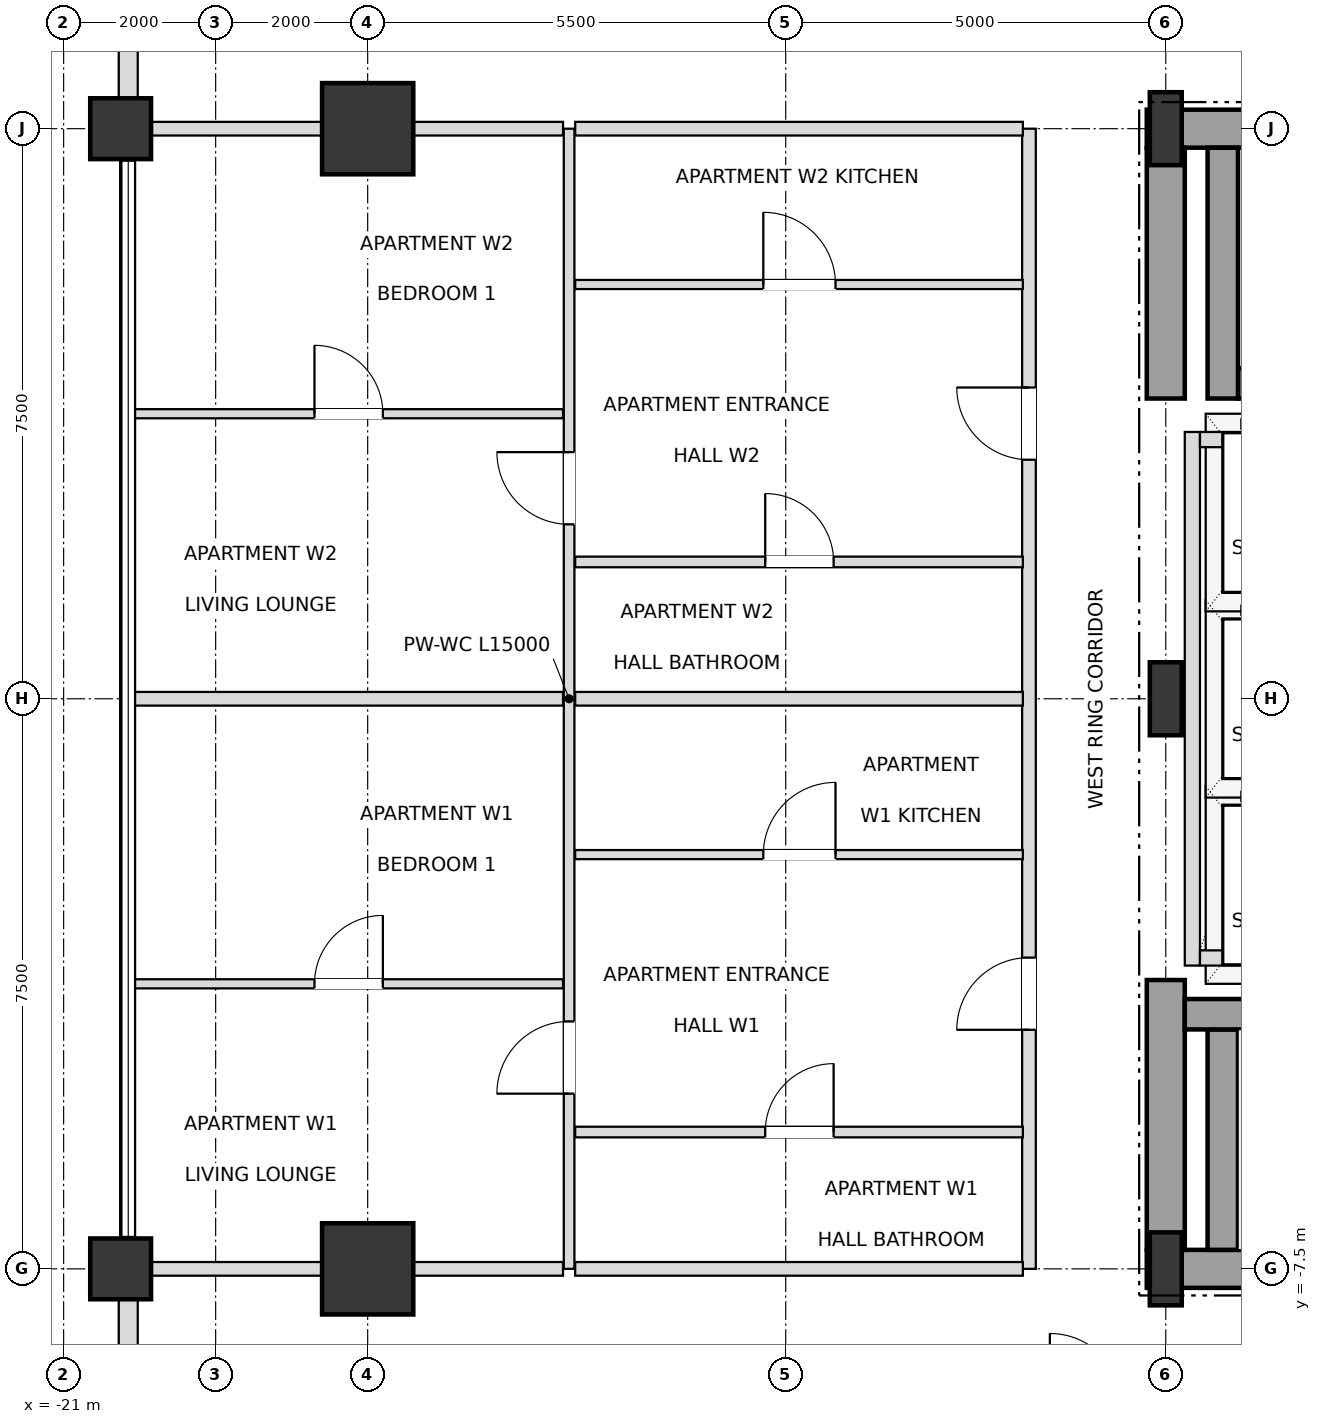
"""IFC4 building model, lengths in metres.
Left out: names, types, materials, properties, quantities, classifications, styles, units other than length and angle.
Written with IfcOpenShell. Run it as: python <this file> out.ifc"""

import sys

from ifc_helpers import new_model, si_unit, direction, frame, frame_2d, origin, origin_2d, place, context, subcontext, project, spatial, rectangle, i_section, extrude, element, fill, save


model = new_model("IFC4")
c1 = context("Model", 3, precision=1e-05, world=origin(), true_north=direction((0.0, 1.0)))
c2 = subcontext(c1, "Body", "Model", "MODEL_VIEW")
j1 = project(units=[si_unit("LENGTHUNIT", "METRE"), si_unit("PLANEANGLEUNIT", "RADIAN")], contexts=[c1])
p1 = place(None, origin())
s1 = spatial("IfcSite", under=j1, at=p1, CompositionType="ELEMENT")
p2 = place(p1, origin())
s2 = spatial("IfcBuilding", under=s1, at=p2, CompositionType="ELEMENT")
p3 = place(p2, frame((0.0, 0.0, 117.0)))
s3 = spatial("IfcBuildingStorey", under=s2, at=p3, CompositionType="ELEMENT", Elevation=117.0)
for number, where, z_axis, x_axis in (
    (1, (-6.5, -7.5, 0.0), (0.0, 0.0, 1.0), (1.0, 0.0, 0.0)),
    (2, (-6.5, 0.0, 0.0), (0.0, 0.0, 1.0), (1.0, 0.0, 0.0)),
    (3, (-6.5, 7.5, 0.0), (0.0, 0.0, 1.0), (1.0, 0.0, 0.0)),
):
    element("IfcColumn", number, at=place(p3, frame(where, z_axis=z_axis, x_axis=x_axis)), inside=s3, PredefinedType="COLUMN", context=c2, shape_type="SweptSolid", body=[
        extrude(i_section(OverallWidth=0.42, OverallDepth=0.96, WebThickness=0.022, FlangeThickness=0.034, at=origin_2d()), origin(), (0.0, 0.0, 1.0), 3.6),
    ])
for number, where, z_axis, x_axis in (
    (4, (-17.0, 7.5, 0.0), (0.0, 0.0, 1.0), (1.0, 0.0, 0.0)),
    (5, (-17.0, -7.5, 0.0), (0.0, 0.0, 1.0), (1.0, 0.0, 0.0)),
):
    element("IfcColumn", number, at=place(p3, frame(where, z_axis=z_axis, x_axis=x_axis)), inside=s3, PredefinedType="USERDEFINED", context=c2, shape_type="SweptSolid", body=[
        extrude(rectangle(XDim=1.2, YDim=1.2, at=origin_2d()), origin(), (0.0, 0.0, 1.0), 3.6),
    ])
for number, where, z_axis, x_axis in (
    (6, (-20.25, -7.5, 0.0), (0.0, 0.0, 1.0), (1.0, 0.0, 0.0)),
    (7, (-20.25, 7.5, 0.0), (0.0, 0.0, 1.0), (1.0, 0.0, 0.0)),
):
    element("IfcColumn", number, at=place(p3, frame(where, z_axis=z_axis, x_axis=x_axis)), inside=s3, PredefinedType="COLUMN", context=c2, shape_type="SweptSolid", body=[
        extrude(rectangle(XDim=0.8, YDim=0.8, at=origin_2d()), origin(), (0.0, 0.0, 1.0), 3.6),
    ])
p4 = place(p3, frame((-20.15, 12.605, 0.0), z_axis=(0.0, 0.0, 1.0), x_axis=(0.0, -1.0, 0.0)))
e8 = element("IfcWall", 8, at=p4, inside=s3, PredefinedType="SOLIDWALL", context=c2, shape_type="SweptSolid", body=[
    extrude(rectangle(XDim=4.71, YDim=0.25, at=frame_2d((2.355, 0.0))), origin(), (0.0, 0.0, 1.0), 2.656),
])
p5 = place(p4, frame((1.455, 0.0, 0.72)))
e9 = element("IfcOpeningElement", 9, at=p5, cuts=e8, PredefinedType="OPENING", context=c2, shape_type="SweptSolid", body=[
    extrude(rectangle(XDim=1.8, YDim=1.68, at=frame_2d((0.9, 0.84))), frame((0.0, 0.135, 0.0), z_axis=(0.0, -1.0, 0.0), x_axis=(1.0, 0.0, 0.0)), (0.0, 0.0, 1.0), 0.27),
])
p6 = place(p3, frame((-20.15, -7.895, 0.0), z_axis=(0.0, 0.0, 1.0), x_axis=(0.0, -1.0, 0.0)))
e10 = element("IfcWall", 10, at=p6, inside=s3, PredefinedType="SOLIDWALL", context=c2, shape_type="SweptSolid", body=[
    extrude(rectangle(XDim=4.71, YDim=0.25, at=frame_2d((2.355, 0.0))), origin(), (0.0, 0.0, 1.0), 2.656),
])
p7 = place(p6, frame((1.455, 0.0, 0.72)))
e11 = element("IfcOpeningElement", 11, at=p7, cuts=e10, PredefinedType="OPENING", context=c2, shape_type="SweptSolid", body=[
    extrude(rectangle(XDim=1.8, YDim=1.68, at=frame_2d((0.9, 0.84))), frame((0.0, 0.135, 0.0), z_axis=(0.0, -1.0, 0.0), x_axis=(1.0, 0.0, 0.0)), (0.0, 0.0, 1.0), 0.27),
])
p8 = place(p3, frame((-6.75, -7.5, 0.0), z_axis=(0.0, 0.0, 1.0), x_axis=(1.0, 0.0, 0.0)))
e12 = element("IfcWall", 12, at=p8, inside=s3, PredefinedType="SHEAR", context=c2, shape_type="SweptSolid", body=[
    extrude(rectangle(XDim=6.75, YDim=0.5, at=frame_2d((3.375, 0.0))), origin(), (0.0, 0.0, 1.0), 3.3),
])
p9 = place(p3, frame((-6.75, 7.5, 0.0), z_axis=(0.0, 0.0, 1.0), x_axis=(1.0, 0.0, 0.0)))
e13 = element("IfcWall", 13, at=p9, inside=s3, PredefinedType="SHEAR", context=c2, shape_type="SweptSolid", body=[
    extrude(rectangle(XDim=6.75, YDim=0.5, at=frame_2d((3.375, 0.0))), origin(), (0.0, 0.0, 1.0), 3.3),
])
p10 = place(p9, frame((1.65, 0.0, 0.0)))
e14 = element("IfcOpeningElement", 14, at=p10, cuts=e13, PredefinedType="OPENING", context=c2, shape_type="SweptSolid", body=[
    extrude(rectangle(XDim=1.05, YDim=2.15, at=frame_2d((0.525, 1.075))), frame((0.0, 0.26, 0.0), z_axis=(0.0, -1.0, 0.0), x_axis=(1.0, 0.0, 0.0)), (0.0, 0.0, 1.0), 0.52),
])
p11 = place(p3, frame((-6.5, -7.25, 0.0), z_axis=(0.0, 0.0, 1.0), x_axis=(0.0, 1.0, 0.0)))
e15 = element("IfcWall", 15, at=p11, inside=s3, PredefinedType="SHEAR", context=c2, shape_type="SweptSolid", body=[
    extrude(rectangle(XDim=3.55, YDim=0.5, at=frame_2d((1.775, 0.0))), origin(), (0.0, 0.0, 1.0), 3.3),
])
p12 = place(p3, frame((-6.5, 3.95, 0.0), z_axis=(0.0, 0.0, 1.0), x_axis=(0.0, 1.0, 0.0)))
e16 = element("IfcWall", 16, at=p12, inside=s3, PredefinedType="SHEAR", context=c2, shape_type="SweptSolid", body=[
    extrude(rectangle(XDim=3.3, YDim=0.5, at=frame_2d((1.65, 0.0))), origin(), (0.0, 0.0, 1.0), 3.3),
])
p13 = place(p3, frame((-5.75, -7.25, 0.0), z_axis=(0.0, 0.0, 1.0), x_axis=(0.0, 1.0, 0.0)))
e17 = element("IfcWall", 17, at=p13, inside=s3, PredefinedType="SHEAR", context=c2, shape_type="SweptSolid", body=[
    extrude(rectangle(XDim=2.9, YDim=0.4, at=frame_2d((1.45, 0.0))), origin(), (0.0, 0.0, 1.0), 3.3),
])
p14 = place(p3, frame((-6.25, -4.15, 0.0), z_axis=(0.0, 0.0, 1.0), x_axis=(1.0, 0.0, 0.0)))
e18 = element("IfcWall", 18, at=p14, inside=s3, PredefinedType="SHEAR", context=c2, shape_type="SweptSolid", body=[
    extrude(rectangle(XDim=7.78, YDim=0.4, at=frame_2d((3.89, 0.0))), origin(), (0.0, 0.0, 1.0), 3.3),
])
p15 = place(p3, frame((-5.55, 4.15, 0.0), z_axis=(0.0, 0.0, 1.0), x_axis=(1.0, 0.0, 0.0)))
e19 = element("IfcWall", 19, at=p15, inside=s3, PredefinedType="SHEAR", context=c2, shape_type="SweptSolid", body=[
    extrude(rectangle(XDim=7.08, YDim=0.4, at=frame_2d((3.54, 0.0))), origin(), (0.0, 0.0, 1.0), 3.3),
])
p16 = place(p3, frame((-5.75, 3.95, 0.0), z_axis=(0.0, 0.0, 1.0), x_axis=(0.0, 1.0, 0.0)))
e20 = element("IfcWall", 20, at=p16, inside=s3, PredefinedType="SHEAR", context=c2, shape_type="SweptSolid", body=[
    extrude(rectangle(XDim=3.3, YDim=0.4, at=frame_2d((1.65, 0.0))), origin(), (0.0, 0.0, 1.0), 3.3),
])
p17 = place(p3, frame((-6.15, -3.51, 0.0), z_axis=(0.0, 0.0, 1.0), x_axis=(0.0, 1.0, 0.0)))
e21 = element("IfcWall", 21, at=p17, inside=s3, PredefinedType="SOLIDWALL", context=c2, shape_type="SweptSolid", body=[
    extrude(rectangle(XDim=7.02, YDim=0.2, at=frame_2d((3.51, 0.0))), origin(), (0.0, 0.0, 1.0), 3.3),
])
for number, where, z_axis, x_axis in (
    (22, (-6.05, -3.41, 0.0), (0.0, 0.0, 1.0), (1.0, 0.0, 0.0)),
    (23, (-6.05, 3.41, 0.0), (0.0, 0.0, 1.0), (1.0, 0.0, 0.0)),
):
    element("IfcWall", number, at=place(p3, frame(where, z_axis=z_axis, x_axis=x_axis)), inside=s3, PredefinedType="SOLIDWALL", context=c2, shape_type="SweptSolid", body=[
        extrude(rectangle(XDim=2.2, YDim=0.2, at=frame_2d((1.1, 0.0))), origin(), (0.0, 0.0, 1.0), 3.3),
    ])
p18 = place(p3, frame((-14.35, -7.5, 0.0), z_axis=(0.0, 0.0, 1.0), x_axis=(0.0, 1.0, 0.0)))
e24 = element("IfcWall", 24, at=p18, inside=s3, PredefinedType="PARTITIONING", context=c2, shape_type="SweptSolid", body=[
    extrude(rectangle(XDim=15.0, YDim=0.14, at=frame_2d((7.5, 0.0))), origin(), (0.0, 0.0, 1.0), 3.3),
])
p19 = place(p18, frame((2.305, 0.0, 0.0)))
e25 = element("IfcOpeningElement", 25, at=p19, cuts=e24, PredefinedType="OPENING", context=c2, shape_type="SweptSolid", body=[
    extrude(rectangle(XDim=0.95, YDim=2.1, at=frame_2d((0.475, 1.05))), frame((0.0, 0.08, 0.0), z_axis=(0.0, -1.0, 0.0), x_axis=(1.0, 0.0, 0.0)), (0.0, 0.0, 1.0), 0.16),
])
p20 = place(p18, frame((9.795, 0.0, 0.0)))
e26 = element("IfcOpeningElement", 26, at=p20, cuts=e24, PredefinedType="OPENING", context=c2, shape_type="SweptSolid", body=[
    extrude(rectangle(XDim=0.95, YDim=2.1, at=frame_2d((0.475, 1.05))), frame((0.0, 0.08, 0.0), z_axis=(0.0, -1.0, 0.0), x_axis=(1.0, 0.0, 0.0)), (0.0, 0.0, 1.0), 0.16),
])
p21 = place(p3, frame((-8.3, -7.5, 0.0), z_axis=(0.0, 0.0, 1.0), x_axis=(0.0, 1.0, 0.0)))
e27 = element("IfcWall", 27, at=p21, inside=s3, PredefinedType="PARTITIONING", context=c2, shape_type="SweptSolid", body=[
    extrude(rectangle(XDim=15.0, YDim=0.18, at=frame_2d((7.5, 0.0))), origin(), (0.0, 0.0, 1.0), 3.3),
])
p22 = place(p21, frame((3.145, 0.0, 0.0)))
e28 = element("IfcOpeningElement", 28, at=p22, cuts=e27, PredefinedType="OPENING", context=c2, shape_type="SweptSolid", body=[
    extrude(rectangle(XDim=0.95, YDim=2.15, at=frame_2d((0.475, 1.075))), frame((0.0, 0.1, 0.0), z_axis=(0.0, -1.0, 0.0), x_axis=(1.0, 0.0, 0.0)), (0.0, 0.0, 1.0), 0.2),
])
p23 = place(p21, frame((10.645, 0.0, 0.0)))
e29 = element("IfcOpeningElement", 29, at=p23, cuts=e27, PredefinedType="OPENING", context=c2, shape_type="SweptSolid", body=[
    extrude(rectangle(XDim=0.95, YDim=2.15, at=frame_2d((0.475, 1.075))), frame((0.0, 0.1, 0.0), z_axis=(0.0, -1.0, 0.0), x_axis=(1.0, 0.0, 0.0)), (0.0, 0.0, 1.0), 0.2),
])
p24 = place(p3, frame((-20.15, -7.5, 0.0), z_axis=(0.0, 0.0, 1.0), x_axis=(1.0, 0.0, 0.0)))
e30 = element("IfcWall", 30, at=p24, inside=s3, PredefinedType="PARTITIONING", context=c2, shape_type="SweptSolid", body=[
    extrude(rectangle(XDim=5.72, YDim=0.18, at=frame_2d((2.86, 0.0))), origin(), (0.0, 0.0, 1.0), 2.736),
])
p25 = place(p3, frame((-14.27, -7.5, 0.0), z_axis=(0.0, 0.0, 1.0), x_axis=(1.0, 0.0, 0.0)))
e31 = element("IfcWall", 31, at=p25, inside=s3, PredefinedType="PARTITIONING", context=c2, shape_type="SweptSolid", body=[
    extrude(rectangle(XDim=5.89, YDim=0.18, at=frame_2d((2.945, 0.0))), origin(), (0.0, 0.0, 1.0), 2.736),
])
p26 = place(p3, frame((-14.27, -5.7, 0.0), z_axis=(0.0, 0.0, 1.0), x_axis=(1.0, 0.0, 0.0)))
e32 = element("IfcWall", 32, at=p26, inside=s3, PredefinedType="PARTITIONING", context=c2, shape_type="SweptSolid", body=[
    extrude(rectangle(XDim=5.89, YDim=0.14, at=frame_2d((2.945, 0.0))), origin(), (0.0, 0.0, 1.0), 3.3),
])
p27 = place(p26, frame((2.5, 0.0, 0.0)))
e33 = element("IfcOpeningElement", 33, at=p27, cuts=e32, PredefinedType="OPENING", context=c2, shape_type="SweptSolid", body=[
    extrude(rectangle(XDim=0.9, YDim=2.1, at=frame_2d((0.45, 1.05))), frame((0.0, 0.08, 0.0), z_axis=(0.0, -1.0, 0.0), x_axis=(1.0, 0.0, 0.0)), (0.0, 0.0, 1.0), 0.16),
])
p28 = place(p3, frame((-20.07, -3.75, 0.0), z_axis=(0.0, 0.0, 1.0), x_axis=(1.0, 0.0, 0.0)))
e34 = element("IfcWall", 34, at=p28, inside=s3, PredefinedType="PARTITIONING", context=c2, shape_type="SweptSolid", body=[
    extrude(rectangle(XDim=5.64, YDim=0.12, at=frame_2d((2.82, 0.0))), origin(), (0.0, 0.0, 1.0), 2.736),
])
p29 = place(p28, frame((2.37, 0.0, 0.0)))
e35 = element("IfcOpeningElement", 35, at=p29, cuts=e34, PredefinedType="OPENING", context=c2, shape_type="SweptSolid", body=[
    extrude(rectangle(XDim=0.9, YDim=2.1, at=frame_2d((0.45, 1.05))), frame((0.0, 0.07, 0.0), z_axis=(0.0, -1.0, 0.0), x_axis=(1.0, 0.0, 0.0)), (0.0, 0.0, 1.0), 0.14),
])
p30 = place(p3, frame((-14.27, -2.05, 0.0), z_axis=(0.0, 0.0, 1.0), x_axis=(1.0, 0.0, 0.0)))
e36 = element("IfcWall", 36, at=p30, inside=s3, PredefinedType="PARTITIONING", context=c2, shape_type="SweptSolid", body=[
    extrude(rectangle(XDim=5.89, YDim=0.12, at=frame_2d((2.945, 0.0))), origin(), (0.0, 0.0, 1.0), 3.3),
])
p31 = place(p30, frame((2.475, 0.0, 0.0)))
e37 = element("IfcOpeningElement", 37, at=p31, cuts=e36, PredefinedType="OPENING", context=c2, shape_type="SweptSolid", body=[
    extrude(rectangle(XDim=0.95, YDim=2.1, at=frame_2d((0.475, 1.05))), frame((0.0, 0.07, 0.0), z_axis=(0.0, -1.0, 0.0), x_axis=(1.0, 0.0, 0.0)), (0.0, 0.0, 1.0), 0.14),
])
p32 = place(p3, frame((-20.07, 0.0, 0.0), z_axis=(0.0, 0.0, 1.0), x_axis=(1.0, 0.0, 0.0)))
e38 = element("IfcWall", 38, at=p32, inside=s3, PredefinedType="PARTITIONING", context=c2, shape_type="SweptSolid", body=[
    extrude(rectangle(XDim=5.64, YDim=0.18, at=frame_2d((2.82, 0.0))), origin(), (0.0, 0.0, 1.0), 2.736),
])
p33 = place(p3, frame((-14.27, 0.0, 0.0), z_axis=(0.0, 0.0, 1.0), x_axis=(1.0, 0.0, 0.0)))
e39 = element("IfcWall", 39, at=p33, inside=s3, PredefinedType="PARTITIONING", context=c2, shape_type="SweptSolid", body=[
    extrude(rectangle(XDim=5.89, YDim=0.18, at=frame_2d((2.945, 0.0))), origin(), (0.0, 0.0, 1.0), 3.3),
])
p34 = place(p3, frame((-14.27, 1.8, 0.0), z_axis=(0.0, 0.0, 1.0), x_axis=(1.0, 0.0, 0.0)))
e40 = element("IfcWall", 40, at=p34, inside=s3, PredefinedType="PARTITIONING", context=c2, shape_type="SweptSolid", body=[
    extrude(rectangle(XDim=5.89, YDim=0.14, at=frame_2d((2.945, 0.0))), origin(), (0.0, 0.0, 1.0), 3.3),
])
p35 = place(p34, frame((2.5, 0.0, 0.0)))
e41 = element("IfcOpeningElement", 41, at=p35, cuts=e40, PredefinedType="OPENING", context=c2, shape_type="SweptSolid", body=[
    extrude(rectangle(XDim=0.9, YDim=2.1, at=frame_2d((0.45, 1.05))), frame((0.0, 0.08, 0.0), z_axis=(0.0, -1.0, 0.0), x_axis=(1.0, 0.0, 0.0)), (0.0, 0.0, 1.0), 0.16),
])
p36 = place(p3, frame((-20.07, 3.75, 0.0), z_axis=(0.0, 0.0, 1.0), x_axis=(1.0, 0.0, 0.0)))
e42 = element("IfcWall", 42, at=p36, inside=s3, PredefinedType="PARTITIONING", context=c2, shape_type="SweptSolid", body=[
    extrude(rectangle(XDim=5.64, YDim=0.12, at=frame_2d((2.82, 0.0))), origin(), (0.0, 0.0, 1.0), 2.736),
])
p37 = place(p36, frame((2.37, 0.0, 0.0)))
e43 = element("IfcOpeningElement", 43, at=p37, cuts=e42, PredefinedType="OPENING", context=c2, shape_type="SweptSolid", body=[
    extrude(rectangle(XDim=0.9, YDim=2.1, at=frame_2d((0.45, 1.05))), frame((0.0, 0.07, 0.0), z_axis=(0.0, -1.0, 0.0), x_axis=(1.0, 0.0, 0.0)), (0.0, 0.0, 1.0), 0.14),
])
p38 = place(p3, frame((-14.27, 5.45, 0.0), z_axis=(0.0, 0.0, 1.0), x_axis=(1.0, 0.0, 0.0)))
e44 = element("IfcWall", 44, at=p38, inside=s3, PredefinedType="PARTITIONING", context=c2, shape_type="SweptSolid", body=[
    extrude(rectangle(XDim=5.89, YDim=0.12, at=frame_2d((2.945, 0.0))), origin(), (0.0, 0.0, 1.0), 3.3),
])
p39 = place(p38, frame((2.475, 0.0, 0.0)))
e45 = element("IfcOpeningElement", 45, at=p39, cuts=e44, PredefinedType="OPENING", context=c2, shape_type="SweptSolid", body=[
    extrude(rectangle(XDim=0.95, YDim=2.1, at=frame_2d((0.475, 1.05))), frame((0.0, 0.07, 0.0), z_axis=(0.0, -1.0, 0.0), x_axis=(1.0, 0.0, 0.0)), (0.0, 0.0, 1.0), 0.14),
])
p40 = place(p3, frame((-20.15, 7.5, 0.0), z_axis=(0.0, 0.0, 1.0), x_axis=(1.0, 0.0, 0.0)))
e46 = element("IfcWall", 46, at=p40, inside=s3, PredefinedType="PARTITIONING", context=c2, shape_type="SweptSolid", body=[
    extrude(rectangle(XDim=5.72, YDim=0.18, at=frame_2d((2.86, 0.0))), origin(), (0.0, 0.0, 1.0), 2.736),
])
p41 = place(p3, frame((-14.27, 7.5, 0.0), z_axis=(0.0, 0.0, 1.0), x_axis=(1.0, 0.0, 0.0)))
e47 = element("IfcWall", 47, at=p41, inside=s3, PredefinedType="PARTITIONING", context=c2, shape_type="SweptSolid", body=[
    extrude(rectangle(XDim=5.89, YDim=0.18, at=frame_2d((2.945, 0.0))), origin(), (0.0, 0.0, 1.0), 2.736),
])
p42 = place(p27, origin())
e48 = element("IfcDoor", 48, at=p42, inside=s3, OperationType="SINGLE_SWING_RIGHT", PredefinedType="DOOR", context=c2, shape_type="SweptSolid", body=[
    extrude(rectangle(XDim=0.9, YDim=2.1, at=frame_2d((0.45, 1.05))), frame((0.0, 0.025, 0.0), z_axis=(0.0, -1.0, 0.0), x_axis=(1.0, 0.0, 0.0)), (0.0, 0.0, 1.0), 0.05),
])
fill(e33, e48)
p43 = place(p22, origin())
e49 = element("IfcDoor", 49, at=p43, inside=s3, OperationType="SINGLE_SWING_LEFT", PredefinedType="DOOR", context=c2, shape_type="SweptSolid", body=[
    extrude(rectangle(XDim=0.95, YDim=2.15, at=frame_2d((0.475, 1.075))), frame((0.0, 0.025, 0.0), z_axis=(0.0, -1.0, 0.0), x_axis=(1.0, 0.0, 0.0)), (0.0, 0.0, 1.0), 0.05),
])
fill(e28, e49)
p44 = place(p31, origin())
e50 = element("IfcDoor", 50, at=p44, inside=s3, OperationType="SINGLE_SWING_RIGHT", PredefinedType="DOOR", context=c2, shape_type="SweptSolid", body=[
    extrude(rectangle(XDim=0.95, YDim=2.1, at=frame_2d((0.475, 1.05))), frame((0.0, 0.025, 0.0), z_axis=(0.0, -1.0, 0.0), x_axis=(1.0, 0.0, 0.0)), (0.0, 0.0, 1.0), 0.05),
])
fill(e37, e50)
p45 = place(p19, origin())
e51 = element("IfcDoor", 51, at=p45, inside=s3, OperationType="SINGLE_SWING_LEFT", PredefinedType="DOOR", context=c2, shape_type="SweptSolid", body=[
    extrude(rectangle(XDim=0.95, YDim=2.1, at=frame_2d((0.475, 1.05))), frame((0.0, 0.025, 0.0), z_axis=(0.0, -1.0, 0.0), x_axis=(1.0, 0.0, 0.0)), (0.0, 0.0, 1.0), 0.05),
])
fill(e25, e51)
p46 = place(p29, origin())
e52 = element("IfcDoor", 52, at=p46, inside=s3, OperationType="SINGLE_SWING_RIGHT", PredefinedType="DOOR", context=c2, shape_type="SweptSolid", body=[
    extrude(rectangle(XDim=0.9, YDim=2.1, at=frame_2d((0.45, 1.05))), frame((0.0, 0.025, 0.0), z_axis=(0.0, -1.0, 0.0), x_axis=(1.0, 0.0, 0.0)), (0.0, 0.0, 1.0), 0.05),
])
fill(e35, e52)
p47 = place(p35, origin())
e53 = element("IfcDoor", 53, at=p47, inside=s3, OperationType="SINGLE_SWING_LEFT", PredefinedType="DOOR", context=c2, shape_type="SweptSolid", body=[
    extrude(rectangle(XDim=0.9, YDim=2.1, at=frame_2d((0.45, 1.05))), frame((0.0, 0.025, 0.0), z_axis=(0.0, -1.0, 0.0), x_axis=(1.0, 0.0, 0.0)), (0.0, 0.0, 1.0), 0.05),
])
fill(e41, e53)
p48 = place(p23, origin())
e54 = element("IfcDoor", 54, at=p48, inside=s3, OperationType="SINGLE_SWING_RIGHT", PredefinedType="DOOR", context=c2, shape_type="SweptSolid", body=[
    extrude(rectangle(XDim=0.95, YDim=2.15, at=frame_2d((0.475, 1.075))), frame((0.0, 0.025, 0.0), z_axis=(0.0, -1.0, 0.0), x_axis=(1.0, 0.0, 0.0)), (0.0, 0.0, 1.0), 0.05),
])
fill(e29, e54)
p49 = place(p39, origin())
e55 = element("IfcDoor", 55, at=p49, inside=s3, OperationType="SINGLE_SWING_LEFT", PredefinedType="DOOR", context=c2, shape_type="SweptSolid", body=[
    extrude(rectangle(XDim=0.95, YDim=2.1, at=frame_2d((0.475, 1.05))), frame((0.0, 0.025, 0.0), z_axis=(0.0, -1.0, 0.0), x_axis=(1.0, 0.0, 0.0)), (0.0, 0.0, 1.0), 0.05),
])
fill(e45, e55)
p50 = place(p20, origin())
e56 = element("IfcDoor", 56, at=p50, inside=s3, OperationType="SINGLE_SWING_RIGHT", PredefinedType="DOOR", context=c2, shape_type="SweptSolid", body=[
    extrude(rectangle(XDim=0.95, YDim=2.1, at=frame_2d((0.475, 1.05))), frame((0.0, 0.025, 0.0), z_axis=(0.0, -1.0, 0.0), x_axis=(1.0, 0.0, 0.0)), (0.0, 0.0, 1.0), 0.05),
])
fill(e26, e56)
p51 = place(p37, origin())
e57 = element("IfcDoor", 57, at=p51, inside=s3, OperationType="SINGLE_SWING_LEFT", PredefinedType="DOOR", context=c2, shape_type="SweptSolid", body=[
    extrude(rectangle(XDim=0.9, YDim=2.1, at=frame_2d((0.45, 1.05))), frame((0.0, 0.025, 0.0), z_axis=(0.0, -1.0, 0.0), x_axis=(1.0, 0.0, 0.0)), (0.0, 0.0, 1.0), 0.05),
])
fill(e43, e57)
save(model, sys.argv[1])
